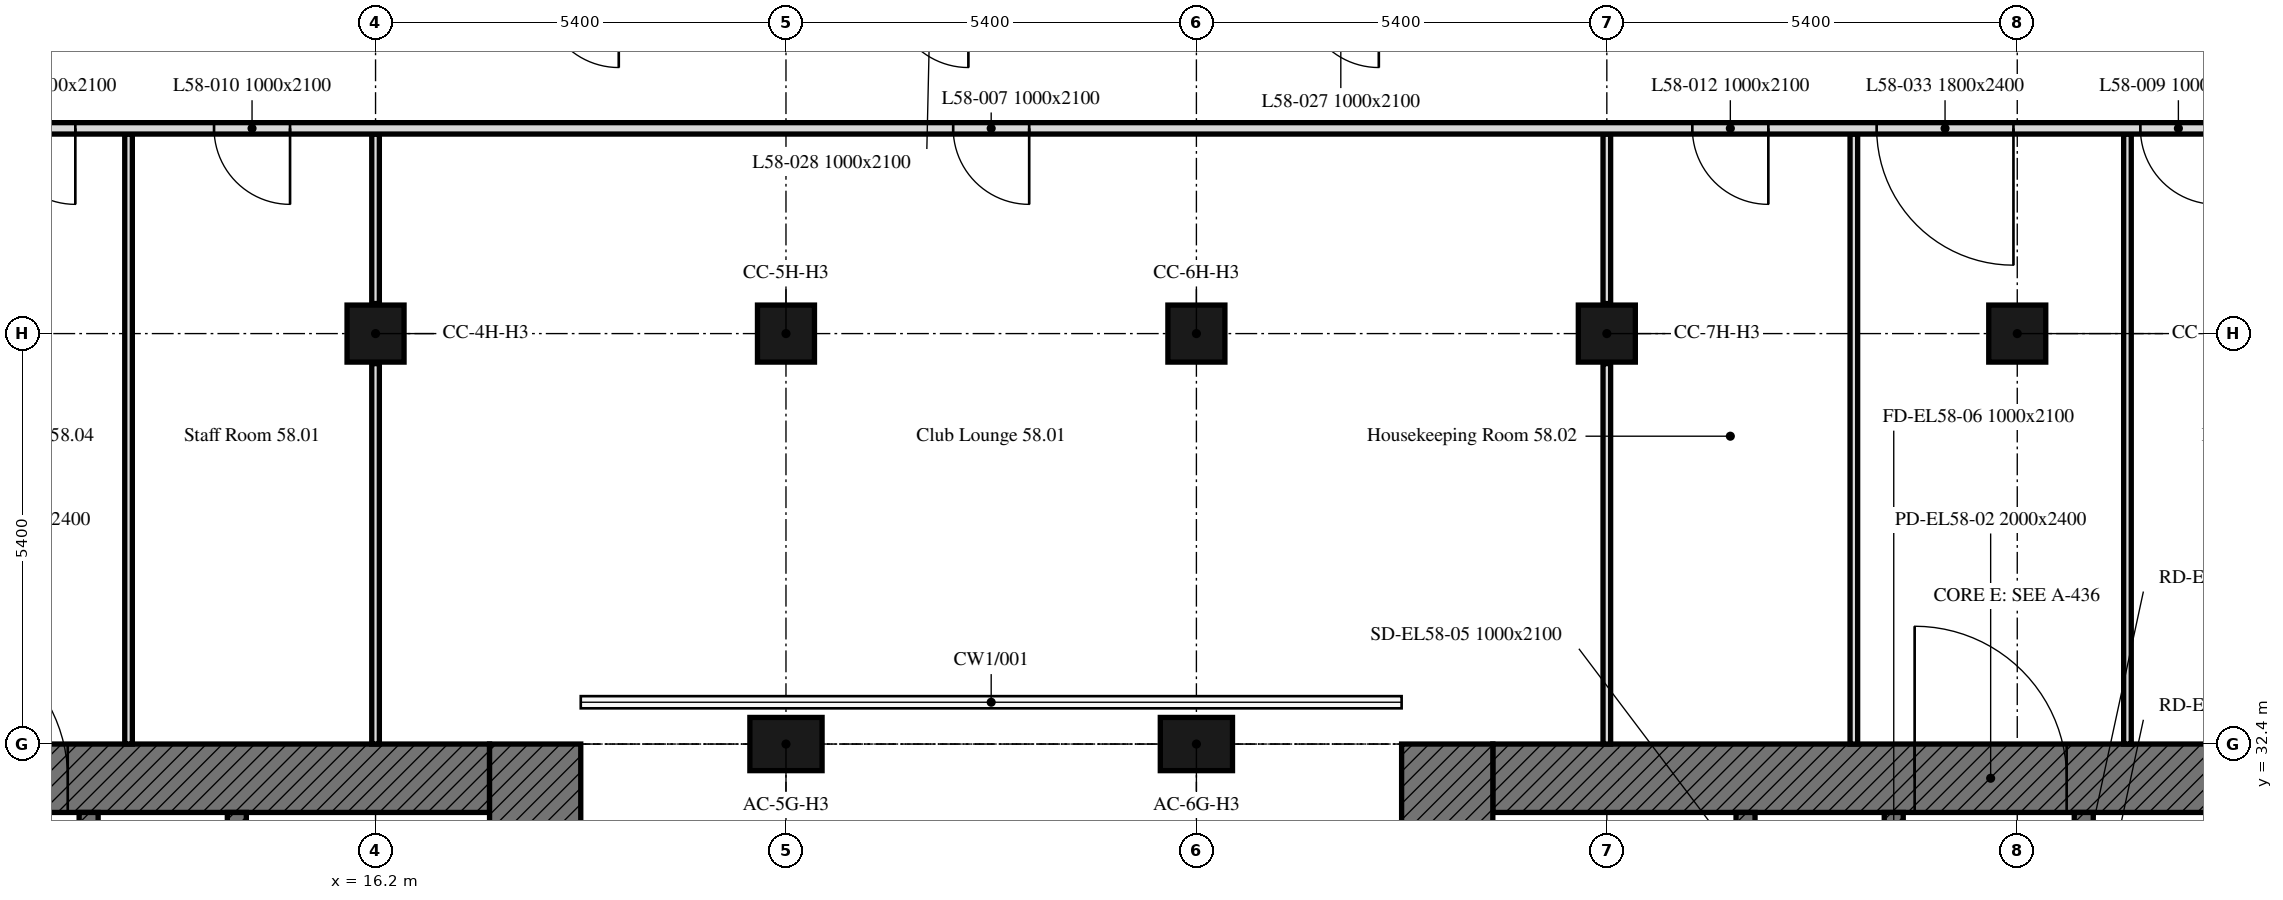
"""IFC4 building model, lengths in metres.
Left out: names, types, materials, properties, quantities, classifications, styles, units other than length and angle.
Written with IfcOpenShell. Run it as: python <this file> out.ifc"""

import sys

from ifc_helpers import new_model, si_unit, direction, frame, frame_2d, origin, origin_2d, place, context, subcontext, project, spatial, rectangle, extrude, element, fill, save


model = new_model("IFC4")
c1 = context("Model", 3, precision=1e-05, world=origin(), true_north=direction((0.0, 1.0)))
c2 = subcontext(c1, "Body", "Model", "MODEL_VIEW")
j1 = project(units=[si_unit("LENGTHUNIT", "METRE"), si_unit("PLANEANGLEUNIT", "RADIAN")], contexts=[c1])
p1 = place(None, origin())
s1 = spatial("IfcSite", under=j1, at=p1, CompositionType="ELEMENT")
p2 = place(p1, origin())
s2 = spatial("IfcBuilding", under=s1, at=p2, CompositionType="ELEMENT")
p3 = place(p2, frame((0.0, 0.0, 230.2)))
s3 = spatial("IfcBuildingStorey", under=s2, at=p3, CompositionType="ELEMENT", Elevation=230.2)
for number, where, z_axis, x_axis in (
    (1, (21.6, 32.4, 0.0), (0.0, 0.0, 1.0), (1.0, 0.0, 0.0)),
    (2, (27.0, 32.4, 0.0), (0.0, 0.0, 1.0), (1.0, 0.0, 0.0)),
):
    element("IfcColumn", number, at=place(p3, frame(where, z_axis=z_axis, x_axis=x_axis)), inside=s3, PredefinedType="COLUMN", context=c2, shape_type="SweptSolid", body=[
        extrude(rectangle(XDim=0.95, YDim=0.7, at=origin_2d()), origin(), (0.0, 0.0, 1.0), 2.8),
    ])
for number, where, z_axis, x_axis in (
    (3, (16.2, 37.8, 0.0), (0.0, 0.0, 1.0), (1.0, 0.0, 0.0)),
    (4, (21.6, 37.8, 0.0), (0.0, 0.0, 1.0), (1.0, 0.0, 0.0)),
    (5, (27.0, 37.8, 0.0), (0.0, 0.0, 1.0), (1.0, 0.0, 0.0)),
    (6, (32.4, 37.8, 0.0), (0.0, 0.0, 1.0), (1.0, 0.0, 0.0)),
    (7, (37.8, 37.8, 0.0), (0.0, 0.0, 1.0), (1.0, 0.0, 0.0)),
):
    element("IfcColumn", number, at=place(p3, frame(where, z_axis=z_axis, x_axis=x_axis)), inside=s3, PredefinedType="COLUMN", context=c2, shape_type="SweptSolid", body=[
        extrude(rectangle(XDim=0.75, YDim=0.75, at=origin_2d()), origin(), (0.0, 0.0, 1.0), 2.8),
    ])
p4 = place(p3, frame((6.6, 31.95, 0.0), z_axis=(0.0, 0.0, 1.0), x_axis=(1.0, 0.0, 0.0)))
e8 = element("IfcWall", 8, at=p4, inside=s3, PredefinedType="SOLIDWALL", context=c2, shape_type="SweptSolid", body=[
    extrude(rectangle(XDim=11.1, YDim=0.9, at=frame_2d((5.55, 0.0))), origin(), (0.0, 0.0, 1.0), 2.8),
])
p5 = place(p4, frame((3.55, 0.0, 0.0)))
e9 = element("IfcOpeningElement", 9, at=p5, cuts=e8, PredefinedType="OPENING", context=c2, shape_type="SweptSolid", body=[
    extrude(rectangle(XDim=2.0, YDim=2.4, at=frame_2d((1.0, 1.2))), frame((0.0, 0.45, 0.0), z_axis=(0.0, -1.0, 0.0), x_axis=(1.0, 0.0, 0.0)), (0.0, 0.0, 1.0), 0.9),
])
p6 = place(p3, frame((18.3, 32.4, 0.0), z_axis=(0.0, 0.0, 1.0), x_axis=(0.0, -1.0, 0.0)))
e10 = element("IfcWall", 10, at=p6, inside=s3, PredefinedType="SOLIDWALL", context=c2, shape_type="SweptSolid", body=[
    extrude(rectangle(XDim=16.2, YDim=1.2, at=frame_2d((8.1, 0.0))), origin(), (0.0, 0.0, 1.0), 2.8),
])
p7 = place(p3, frame((14.375, 17.1, 0.0), z_axis=(0.0, 0.0, 1.0), x_axis=(0.0, 1.0, 0.0)))
e11 = element("IfcWall", 11, at=p7, inside=s3, PredefinedType="SOLIDWALL", context=c2, shape_type="SweptSolid", body=[
    extrude(rectangle(XDim=14.4, YDim=0.25, at=frame_2d((7.2, 0.0))), origin(), (0.0, 0.0, 1.0), 2.8),
])
p8 = place(p7, frame((13.15, 0.0, 0.0)))
e12 = element("IfcOpeningElement", 12, at=p8, cuts=e11, PredefinedType="OPENING", context=c2, shape_type="SweptSolid", body=[
    extrude(rectangle(XDim=1.0, YDim=2.1, at=frame_2d((0.5, 1.05))), frame((0.0, 0.125, 0.0), z_axis=(0.0, -1.0, 0.0), x_axis=(1.0, 0.0, 0.0)), (0.0, 0.0, 1.0), 0.25),
])
p9 = place(p7, frame((0.6, 0.0, 0.0)))
e13 = element("IfcOpeningElement", 13, at=p9, cuts=e11, PredefinedType="OPENING", context=c2, shape_type="SweptSolid", body=[
    extrude(rectangle(XDim=1.1, YDim=2.1, at=frame_2d((0.55, 1.05))), frame((0.0, 0.125, 0.0), z_axis=(0.0, -1.0, 0.0), x_axis=(1.0, 0.0, 0.0)), (0.0, 0.0, 1.0), 0.25),
])
p10 = place(p7, frame((3.25, 0.0, 0.0)))
e14 = element("IfcOpeningElement", 14, at=p10, cuts=e11, PredefinedType="OPENING", context=c2, shape_type="SweptSolid", body=[
    extrude(rectangle(XDim=0.9, YDim=2.1, at=frame_2d((0.45, 1.05))), frame((0.0, 0.125, 0.0), z_axis=(0.0, -1.0, 0.0), x_axis=(1.0, 0.0, 0.0)), (0.0, 0.0, 1.0), 0.25),
])
p11 = place(p3, frame((12.425, 29.4, 0.0), z_axis=(0.0, 0.0, 1.0), x_axis=(0.0, 1.0, 0.0)))
e15 = element("IfcWall", 15, at=p11, inside=s3, PredefinedType="SOLIDWALL", context=c2, shape_type="SweptSolid", body=[
    extrude(rectangle(XDim=2.1, YDim=0.25, at=frame_2d((1.05, 0.0))), origin(), (0.0, 0.0, 1.0), 2.8),
])
p12 = place(p11, frame((0.5, 0.0, 0.0)))
e16 = element("IfcOpeningElement", 16, at=p12, cuts=e15, PredefinedType="OPENING", context=c2, shape_type="SweptSolid", body=[
    extrude(rectangle(XDim=1.0, YDim=2.1, at=frame_2d((0.5, 1.05))), frame((0.0, 0.125, 0.0), z_axis=(0.0, -1.0, 0.0), x_axis=(1.0, 0.0, 0.0)), (0.0, 0.0, 1.0), 0.25),
])
p13 = place(p3, frame((30.9, 31.95, 0.0), z_axis=(0.0, 0.0, 1.0), x_axis=(1.0, 0.0, 0.0)))
e17 = element("IfcWall", 17, at=p13, inside=s3, PredefinedType="SOLIDWALL", context=c2, shape_type="SweptSolid", body=[
    extrude(rectangle(XDim=11.1, YDim=0.9, at=frame_2d((5.55, 0.0))), origin(), (0.0, 0.0, 1.0), 2.8),
])
p14 = place(p13, frame((5.55, 0.0, 0.0)))
e18 = element("IfcOpeningElement", 18, at=p14, cuts=e17, PredefinedType="OPENING", context=c2, shape_type="SweptSolid", body=[
    extrude(rectangle(XDim=2.0, YDim=2.4, at=frame_2d((1.0, 1.2))), frame((0.0, 0.45, 0.0), z_axis=(0.0, -1.0, 0.0), x_axis=(1.0, 0.0, 0.0)), (0.0, 0.0, 1.0), 0.9),
])
p15 = place(p3, frame((30.3, 16.2, 0.0), z_axis=(0.0, 0.0, 1.0), x_axis=(0.0, 1.0, 0.0)))
e19 = element("IfcWall", 19, at=p15, inside=s3, PredefinedType="SOLIDWALL", context=c2, shape_type="SweptSolid", body=[
    extrude(rectangle(XDim=16.2, YDim=1.2, at=frame_2d((8.1, 0.0))), origin(), (0.0, 0.0, 1.0), 2.8),
])
p16 = place(p3, frame((38.675, 17.1, 0.0), z_axis=(0.0, 0.0, 1.0), x_axis=(0.0, 1.0, 0.0)))
e20 = element("IfcWall", 20, at=p16, inside=s3, PredefinedType="SOLIDWALL", context=c2, shape_type="SweptSolid", body=[
    extrude(rectangle(XDim=14.4, YDim=0.25, at=frame_2d((7.2, 0.0))), origin(), (0.0, 0.0, 1.0), 2.8),
])
p17 = place(p16, frame((4.6, 0.0, 0.0)))
e21 = element("IfcOpeningElement", 21, at=p17, cuts=e20, PredefinedType="OPENING", context=c2, shape_type="SweptSolid", body=[
    extrude(rectangle(XDim=1.0, YDim=2.1, at=frame_2d((0.5, 1.05))), frame((0.0, 0.125, 0.0), z_axis=(0.0, -1.0, 0.0), x_axis=(1.0, 0.0, 0.0)), (0.0, 0.0, 1.0), 0.25),
])
p18 = place(p16, frame((7.062, 0.0, 0.0)))
e22 = element("IfcOpeningElement", 22, at=p18, cuts=e20, PredefinedType="OPENING", context=c2, shape_type="SweptSolid", body=[
    extrude(rectangle(XDim=1.2, YDim=2.1, at=frame_2d((0.6, 1.05))), frame((0.0, 0.125, 0.0), z_axis=(0.0, -1.0, 0.0), x_axis=(1.0, 0.0, 0.0)), (0.0, 0.0, 1.0), 0.25),
])
p19 = place(p16, frame((9.726, 0.0, 0.0)))
e23 = element("IfcOpeningElement", 23, at=p19, cuts=e20, PredefinedType="OPENING", context=c2, shape_type="SweptSolid", body=[
    extrude(rectangle(XDim=0.9, YDim=2.1, at=frame_2d((0.45, 1.05))), frame((0.0, 0.125, 0.0), z_axis=(0.0, -1.0, 0.0), x_axis=(1.0, 0.0, 0.0)), (0.0, 0.0, 1.0), 0.25),
])
p20 = place(p16, frame((11.539, 0.0, 0.0)))
e24 = element("IfcOpeningElement", 24, at=p20, cuts=e20, PredefinedType="OPENING", context=c2, shape_type="SweptSolid", body=[
    extrude(rectangle(XDim=0.9, YDim=2.1, at=frame_2d((0.45, 1.05))), frame((0.0, 0.125, 0.0), z_axis=(0.0, -1.0, 0.0), x_axis=(1.0, 0.0, 0.0)), (0.0, 0.0, 1.0), 0.25),
])
p21 = place(p16, frame((13.226, 0.0, 0.0)))
e25 = element("IfcOpeningElement", 25, at=p21, cuts=e20, PredefinedType="OPENING", context=c2, shape_type="SweptSolid", body=[
    extrude(rectangle(XDim=0.9, YDim=2.1, at=frame_2d((0.45, 1.05))), frame((0.0, 0.125, 0.0), z_axis=(0.0, -1.0, 0.0), x_axis=(1.0, 0.0, 0.0)), (0.0, 0.0, 1.0), 0.25),
])
p22 = place(p3, frame((34.225, 17.1, 0.0), z_axis=(0.0, 0.0, 1.0), x_axis=(0.0, 1.0, 0.0)))
e26 = element("IfcWall", 26, at=p22, inside=s3, PredefinedType="SOLIDWALL", context=c2, shape_type="SweptSolid", body=[
    extrude(rectangle(XDim=14.4, YDim=0.25, at=frame_2d((7.2, 0.0))), origin(), (0.0, 0.0, 1.0), 2.8),
])
p23 = place(p22, frame((13.15, 0.0, 0.0)))
e27 = element("IfcOpeningElement", 27, at=p23, cuts=e26, PredefinedType="OPENING", context=c2, shape_type="SweptSolid", body=[
    extrude(rectangle(XDim=1.0, YDim=2.1, at=frame_2d((0.5, 1.05))), frame((0.0, 0.125, 0.0), z_axis=(0.0, -1.0, 0.0), x_axis=(1.0, 0.0, 0.0)), (0.0, 0.0, 1.0), 0.25),
])
p24 = place(p22, frame((0.6, 0.0, 0.0)))
e28 = element("IfcOpeningElement", 28, at=p24, cuts=e26, PredefinedType="OPENING", context=c2, shape_type="SweptSolid", body=[
    extrude(rectangle(XDim=1.1, YDim=2.1, at=frame_2d((0.55, 1.05))), frame((0.0, 0.125, 0.0), z_axis=(0.0, -1.0, 0.0), x_axis=(1.0, 0.0, 0.0)), (0.0, 0.0, 1.0), 0.25),
])
p25 = place(p22, frame((3.25, 0.0, 0.0)))
e29 = element("IfcOpeningElement", 29, at=p25, cuts=e26, PredefinedType="OPENING", context=c2, shape_type="SweptSolid", body=[
    extrude(rectangle(XDim=0.9, YDim=2.1, at=frame_2d((0.45, 1.05))), frame((0.0, 0.125, 0.0), z_axis=(0.0, -1.0, 0.0), x_axis=(1.0, 0.0, 0.0)), (0.0, 0.0, 1.0), 0.25),
])
p26 = place(p3, frame((36.175, 29.4, 0.0), z_axis=(0.0, 0.0, 1.0), x_axis=(0.0, 1.0, 0.0)))
e30 = element("IfcWall", 30, at=p26, inside=s3, PredefinedType="SOLIDWALL", context=c2, shape_type="SweptSolid", body=[
    extrude(rectangle(XDim=2.1, YDim=0.25, at=frame_2d((1.05, 0.0))), origin(), (0.0, 0.0, 1.0), 2.8),
])
p27 = place(p26, frame((0.5, 0.0, 0.0)))
e31 = element("IfcOpeningElement", 31, at=p27, cuts=e30, PredefinedType="OPENING", context=c2, shape_type="SweptSolid", body=[
    extrude(rectangle(XDim=1.0, YDim=2.1, at=frame_2d((0.5, 1.05))), frame((0.0, 0.125, 0.0), z_axis=(0.0, -1.0, 0.0), x_axis=(1.0, 0.0, 0.0)), (0.0, 0.0, 1.0), 0.25),
])
p28 = place(p3, frame((32.4, 32.4, 0.0), z_axis=(0.0, 0.0, 1.0), x_axis=(0.0, 1.0, 0.0)))
e32 = element("IfcWall", 32, at=p28, inside=s3, PredefinedType="PARTITIONING", context=c2, shape_type="SweptSolid", body=[
    extrude(rectangle(XDim=5.005, YDim=0.1, at=frame_2d((2.502, 0.0))), origin(), (0.0, 0.0, 1.0), 2.2),
])
for number, where, z_axis, x_axis in (
    (33, (32.4, 38.195, 0.0), (0.0, 0.0, 1.0), (0.0, 1.0, 0.0)),
    (34, (16.2, 40.425, 0.0), (0.0, 0.0, 1.0), (0.0, -1.0, 0.0)),
):
    element("IfcWall", number, at=place(p3, frame(where, z_axis=z_axis, x_axis=x_axis)), inside=s3, PredefinedType="PARTITIONING", context=c2, shape_type="SweptSolid", body=[
        extrude(rectangle(XDim=2.23, YDim=0.1, at=frame_2d((1.115, 0.0))), origin(), (0.0, 0.0, 1.0), 2.2),
    ])
p29 = place(p3, frame((16.2, 37.405, 0.0), z_axis=(0.0, 0.0, 1.0), x_axis=(0.0, -1.0, 0.0)))
e35 = element("IfcWall", 35, at=p29, inside=s3, PredefinedType="PARTITIONING", context=c2, shape_type="SweptSolid", body=[
    extrude(rectangle(XDim=5.005, YDim=0.1, at=frame_2d((2.502, 0.0))), origin(), (0.0, 0.0, 1.0), 2.2),
])
for number, where, z_axis, x_axis in (
    (36, (39.25, 32.4, 0.0), (0.0, 0.0, 1.0), (0.0, 1.0, 0.0)),
    (37, (35.65, 40.425, 0.0), (0.0, 0.0, 1.0), (0.0, -1.0, 0.0)),
):
    element("IfcWall", number, at=place(p3, frame(where, z_axis=z_axis, x_axis=x_axis)), inside=s3, PredefinedType="PARTITIONING", context=c2, shape_type="SweptSolid", body=[
        extrude(rectangle(XDim=8.025, YDim=0.1, at=frame_2d((4.013, 0.0))), origin(), (0.0, 0.0, 1.0), 2.8),
    ])
p30 = place(p3, frame((12.95, 32.4, 0.0), z_axis=(0.0, 0.0, 1.0), x_axis=(0.0, 1.0, 0.0)))
e38 = element("IfcWall", 38, at=p30, inside=s3, PredefinedType="PARTITIONING", context=c2, shape_type="SweptSolid", body=[
    extrude(rectangle(XDim=8.025, YDim=0.1, at=frame_2d((4.013, 0.0))), origin(), (0.0, 0.0, 1.0), 2.2),
])
p31 = place(p3, frame((42.449, 40.5, 0.0), z_axis=(0.0, 0.0, 1.0), x_axis=(-1.0, 0.0, 0.0)))
e39 = element("IfcWall", 39, at=p31, inside=s3, PredefinedType="PARTITIONING", context=c2, shape_type="SweptSolid", body=[
    extrude(rectangle(XDim=36.974, YDim=0.15, at=frame_2d((18.487, 0.0))), origin(), (0.0, 0.0, 1.0), 2.2),
])
p32 = place(p31, frame((17.649, 0.0, 0.0)))
e40 = element("IfcOpeningElement", 40, at=p32, cuts=e39, PredefinedType="OPENING", context=c2, shape_type="SweptSolid", body=[
    extrude(rectangle(XDim=1.0, YDim=2.1, at=frame_2d((0.5, 1.05))), frame((0.0, 0.075, 0.0), z_axis=(0.0, -1.0, 0.0), x_axis=(1.0, 0.0, 0.0)), (0.0, 0.0, 1.0), 0.15),
])
p33 = place(p31, frame((2.029, 0.0, 0.0)))
e41 = element("IfcOpeningElement", 41, at=p33, cuts=e39, PredefinedType="OPENING", context=c2, shape_type="SweptSolid", body=[
    extrude(rectangle(XDim=1.0, YDim=2.1, at=frame_2d((0.5, 1.05))), frame((0.0, 0.075, 0.0), z_axis=(0.0, -1.0, 0.0), x_axis=(1.0, 0.0, 0.0)), (0.0, 0.0, 1.0), 0.15),
])
p34 = place(p31, frame((27.374, 0.0, 0.0)))
e42 = element("IfcOpeningElement", 42, at=p34, cuts=e39, PredefinedType="OPENING", context=c2, shape_type="SweptSolid", body=[
    extrude(rectangle(XDim=1.0, YDim=2.1, at=frame_2d((0.5, 1.05))), frame((0.0, 0.075, 0.0), z_axis=(0.0, -1.0, 0.0), x_axis=(1.0, 0.0, 0.0)), (0.0, 0.0, 1.0), 0.15),
])
p35 = place(p31, frame((7.924, 0.0, 0.0)))
e43 = element("IfcOpeningElement", 43, at=p35, cuts=e39, PredefinedType="OPENING", context=c2, shape_type="SweptSolid", body=[
    extrude(rectangle(XDim=1.0, YDim=2.1, at=frame_2d((0.5, 1.05))), frame((0.0, 0.075, 0.0), z_axis=(0.0, -1.0, 0.0), x_axis=(1.0, 0.0, 0.0)), (0.0, 0.0, 1.0), 0.15),
])
p36 = place(p31, frame((4.699, 0.0, 0.0)))
e44 = element("IfcOpeningElement", 44, at=p36, cuts=e39, PredefinedType="OPENING", context=c2, shape_type="SweptSolid", body=[
    extrude(rectangle(XDim=1.8, YDim=2.4, at=frame_2d((0.9, 1.2))), frame((0.0, 0.075, 0.0), z_axis=(0.0, -1.0, 0.0), x_axis=(1.0, 0.0, 0.0)), (0.0, 0.0, 1.0), 0.15),
])
p37 = place(p31, frame((30.199, 0.0, 0.0)))
e45 = element("IfcOpeningElement", 45, at=p37, cuts=e39, PredefinedType="OPENING", context=c2, shape_type="SweptSolid", body=[
    extrude(rectangle(XDim=1.0, YDim=2.1, at=frame_2d((0.5, 1.05))), frame((0.0, 0.075, 0.0), z_axis=(0.0, -1.0, 0.0), x_axis=(1.0, 0.0, 0.0)), (0.0, 0.0, 1.0), 0.15),
])
p38 = place(p5, origin())
e46 = element("IfcDoor", 46, at=p38, inside=s3, OperationType="DOUBLE_DOOR_SINGLE_SWING", PredefinedType="DOOR", context=c2, shape_type="SweptSolid", body=[
    extrude(rectangle(XDim=2.0, YDim=2.4, at=frame_2d((1.0, 1.2))), frame((0.0, 0.025, 0.0), z_axis=(0.0, -1.0, 0.0), x_axis=(1.0, 0.0, 0.0)), (0.0, 0.0, 1.0), 0.05),
])
fill(e9, e46)
p39 = place(p14, origin())
e47 = element("IfcDoor", 47, at=p39, inside=s3, OperationType="DOUBLE_DOOR_SINGLE_SWING", PredefinedType="DOOR", context=c2, shape_type="SweptSolid", body=[
    extrude(rectangle(XDim=2.0, YDim=2.4, at=frame_2d((1.0, 1.2))), frame((0.0, 0.025, 0.0), z_axis=(0.0, -1.0, 0.0), x_axis=(1.0, 0.0, 0.0)), (0.0, 0.0, 1.0), 0.05),
])
fill(e18, e47)
p40 = place(p32, origin())
e48 = element("IfcDoor", 48, at=p40, inside=s3, OperationType="SINGLE_SWING_RIGHT", PredefinedType="DOOR", context=c2, shape_type="SweptSolid", body=[
    extrude(rectangle(XDim=1.0, YDim=2.1, at=frame_2d((0.5, 1.05))), frame((0.0, 0.025, 0.0), z_axis=(0.0, -1.0, 0.0), x_axis=(1.0, 0.0, 0.0)), (0.0, 0.0, 1.0), 0.05),
])
fill(e40, e48)
p41 = place(p33, origin())
e49 = element("IfcDoor", 49, at=p41, inside=s3, OperationType="SINGLE_SWING_LEFT", PredefinedType="DOOR", context=c2, shape_type="SweptSolid", body=[
    extrude(rectangle(XDim=1.0, YDim=2.1, at=frame_2d((0.5, 1.05))), frame((0.0, 0.025, 0.0), z_axis=(0.0, -1.0, 0.0), x_axis=(1.0, 0.0, 0.0)), (0.0, 0.0, 1.0), 0.05),
])
fill(e41, e49)
p42 = place(p34, origin())
e50 = element("IfcDoor", 50, at=p42, inside=s3, OperationType="SINGLE_SWING_LEFT", PredefinedType="DOOR", context=c2, shape_type="SweptSolid", body=[
    extrude(rectangle(XDim=1.0, YDim=2.1, at=frame_2d((0.5, 1.05))), frame((0.0, 0.025, 0.0), z_axis=(0.0, -1.0, 0.0), x_axis=(1.0, 0.0, 0.0)), (0.0, 0.0, 1.0), 0.05),
])
fill(e42, e50)
p43 = place(p35, origin())
e51 = element("IfcDoor", 51, at=p43, inside=s3, OperationType="SINGLE_SWING_RIGHT", PredefinedType="DOOR", context=c2, shape_type="SweptSolid", body=[
    extrude(rectangle(XDim=1.0, YDim=2.1, at=frame_2d((0.5, 1.05))), frame((0.0, 0.025, 0.0), z_axis=(0.0, -1.0, 0.0), x_axis=(1.0, 0.0, 0.0)), (0.0, 0.0, 1.0), 0.05),
])
fill(e43, e51)
p44 = place(p36, origin())
e52 = element("IfcDoor", 52, at=p44, inside=s3, OperationType="DOUBLE_DOOR_SINGLE_SWING", PredefinedType="DOOR", context=c2, shape_type="SweptSolid", body=[
    extrude(rectangle(XDim=1.8, YDim=2.4, at=frame_2d((0.9, 1.2))), frame((0.0, 0.025, 0.0), z_axis=(0.0, -1.0, 0.0), x_axis=(1.0, 0.0, 0.0)), (0.0, 0.0, 1.0), 0.05),
])
fill(e44, e52)
p45 = place(p37, origin())
e53 = element("IfcDoor", 53, at=p45, inside=s3, OperationType="SINGLE_SWING_LEFT", PredefinedType="DOOR", context=c2, shape_type="SweptSolid", body=[
    extrude(rectangle(XDim=1.0, YDim=2.1, at=frame_2d((0.5, 1.05))), frame((0.0, 0.025, 0.0), z_axis=(0.0, -1.0, 0.0), x_axis=(1.0, 0.0, 0.0)), (0.0, 0.0, 1.0), 0.05),
])
fill(e45, e53)
save(model, sys.argv[1])
